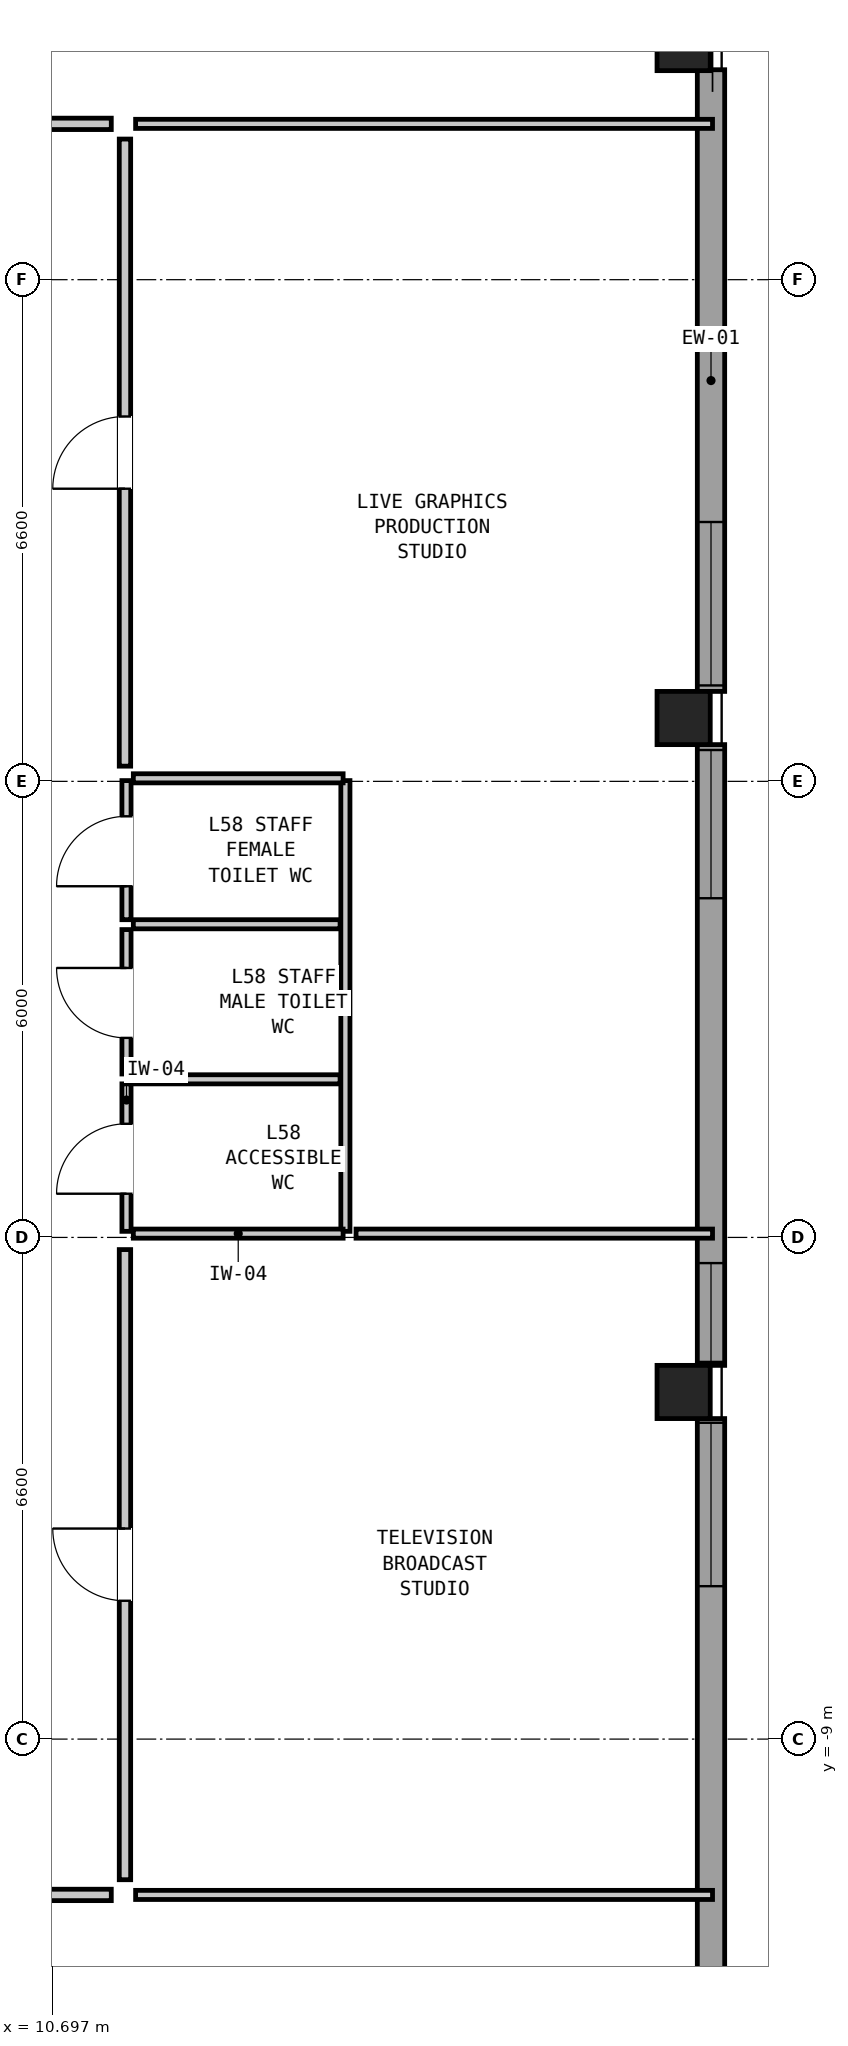
"""IFC4 building model, lengths in metres.
Left out: names, types, materials, properties, quantities, classifications, styles, units other than length and angle.
Written with IfcOpenShell. Run it as: python <this file> out.ifc"""

import sys

from ifc_helpers import new_model, si_unit, direction, frame, frame_2d, origin, origin_2d, place, context, subcontext, project, spatial, rectangle, hollow_rectangle, extrude, element, fill, save


model = new_model("IFC4")
c1 = context("Model", 3, precision=1e-05, world=origin(), true_north=direction((0.0, 1.0)))
c2 = subcontext(c1, "Body", "Model", "MODEL_VIEW")
j1 = project(units=[si_unit("LENGTHUNIT", "METRE"), si_unit("PLANEANGLEUNIT", "RADIAN")], contexts=[c1])
p1 = place(None, origin())
s1 = spatial("IfcSite", under=j1, at=p1, CompositionType="ELEMENT")
p2 = place(p1, origin())
s2 = spatial("IfcBuilding", under=s1, at=p2, CompositionType="ELEMENT")
p3 = place(p2, frame((0.0, 0.0, 199.5)))
s3 = spatial("IfcBuildingStorey", under=s2, at=p3, CompositionType="ELEMENT", Elevation=199.5)
for number, where, z_axis, x_axis in (
    (1, (19.0, -4.433, 0.0), (0.0, 0.0, 1.0), (0.0, 1.0, 0.0)),
    (2, (19.0, 4.433, 0.0), (0.0, 0.0, 1.0), (0.0, 1.0, 0.0)),
    (3, (19.0, 13.3, 0.0), (0.0, 0.0, 1.0), (0.0, 1.0, 0.0)),
):
    element("IfcColumn", number, at=place(p3, frame(where, z_axis=z_axis, x_axis=x_axis)), inside=s3, PredefinedType="COLUMN", context=c2, shape_type="SweptSolid", body=[
        extrude(hollow_rectangle(XDim=0.7, YDim=0.7, WallThickness=0.045, at=origin_2d()), origin(), (0.0, 0.0, 1.0), 3.05),
    ])
p4 = place(p3, frame((19.36, 12.962, 0.0), z_axis=(0.0, 0.0, 1.0), x_axis=(0.0, -1.0, 0.0)))
e4 = element("IfcWall", 4, at=p4, inside=s3, PredefinedType="SOLIDWALL", context=c2, shape_type="SweptSolid", body=[
    extrude(rectangle(XDim=8.179, YDim=0.36, at=frame_2d((4.089, 0.0))), origin(), (0.0, 0.0, 1.0), 1.662),
])
p5 = place(p4, frame((5.95, 0.0, 0.2)))
e5 = element("IfcOpeningElement", 5, at=p5, cuts=e4, PredefinedType="OPENING", context=c2, shape_type="SweptSolid", body=[
    extrude(rectangle(XDim=2.15, YDim=1.05, at=frame_2d((1.075, 0.525))), frame((0.0, 0.192, 0.0), z_axis=(0.0, -1.0, 0.0), x_axis=(1.0, 0.0, 0.0)), (0.0, 0.0, 1.0), 0.384),
])
p6 = place(p3, frame((19.36, 4.083, 0.0), z_axis=(0.0, 0.0, 1.0), x_axis=(0.0, -1.0, 0.0)))
e6 = element("IfcWall", 6, at=p6, inside=s3, PredefinedType="SOLIDWALL", context=c2, shape_type="SweptSolid", body=[
    extrude(rectangle(XDim=8.167, YDim=0.36, at=frame_2d((4.083, 0.0))), origin(), (0.0, 0.0, 1.0), 1.662),
])
p7 = place(p6, frame((0.071, 0.0, 0.2)))
e7 = element("IfcOpeningElement", 7, at=p7, cuts=e6, PredefinedType="OPENING", context=c2, shape_type="SweptSolid", body=[
    extrude(rectangle(XDim=1.95, YDim=0.95, at=frame_2d((0.975, 0.475))), frame((0.0, 0.192, 0.0), z_axis=(0.0, -1.0, 0.0), x_axis=(1.0, 0.0, 0.0)), (0.0, 0.0, 1.0), 0.384),
])
p8 = place(p6, frame((6.821, 0.0, 0.2)))
e8 = element("IfcOpeningElement", 8, at=p8, cuts=e6, PredefinedType="OPENING", context=c2, shape_type="SweptSolid", body=[
    extrude(rectangle(XDim=1.3, YDim=1.3, at=frame_2d((0.65, 0.65))), frame((0.0, 0.192, 0.0), z_axis=(0.0, -1.0, 0.0), x_axis=(1.0, 0.0, 0.0)), (0.0, 0.0, 1.0), 0.384),
])
p9 = place(p3, frame((19.36, -4.783, 0.0), z_axis=(0.0, 0.0, 1.0), x_axis=(0.0, -1.0, 0.0)))
e9 = element("IfcWall", 9, at=p9, inside=s3, PredefinedType="SOLIDWALL", context=c2, shape_type="SweptSolid", body=[
    extrude(rectangle(XDim=8.179, YDim=0.36, at=frame_2d((4.089, 0.0))), origin(), (0.0, 0.0, 1.0), 1.662),
])
p10 = place(p9, frame((0.055, 0.0, 0.2)))
e10 = element("IfcOpeningElement", 10, at=p10, cuts=e9, PredefinedType="OPENING", context=c2, shape_type="SweptSolid", body=[
    extrude(rectangle(XDim=2.15, YDim=1.05, at=frame_2d((1.075, 0.525))), frame((0.0, 0.192, 0.0), z_axis=(0.0, -1.0, 0.0), x_axis=(1.0, 0.0, 0.0)), (0.0, 0.0, 1.0), 0.384),
])
p11 = place(p3, frame((11.67, -2.32, 0.0), z_axis=(0.0, 0.0, 1.0), x_axis=(0.0, 1.0, 0.0)))
e11 = element("IfcWall", 11, at=p11, inside=s3, PredefinedType="PARTITIONING", context=c2, shape_type="SweptSolid", body=[
    extrude(rectangle(XDim=1.94, YDim=0.12, at=frame_2d((0.97, 0.0))), origin(), (0.0, 0.0, 1.0), 2.86),
])
p12 = place(p11, frame((0.495, 0.0, 0.0)))
e12 = element("IfcOpeningElement", 12, at=p12, cuts=e11, PredefinedType="OPENING", context=c2, shape_type="SweptSolid", body=[
    extrude(rectangle(XDim=0.92, YDim=2.1, at=frame_2d((0.46, 1.05))), frame((0.0, 0.072, 0.0), z_axis=(0.0, -1.0, 0.0), x_axis=(1.0, 0.0, 0.0)), (0.0, 0.0, 1.0), 0.144),
])
p13 = place(p3, frame((11.67, -0.25, 0.0), z_axis=(0.0, 0.0, 1.0), x_axis=(0.0, 1.0, 0.0)))
e13 = element("IfcWall", 13, at=p13, inside=s3, PredefinedType="PARTITIONING", context=c2, shape_type="SweptSolid", body=[
    extrude(rectangle(XDim=1.9, YDim=0.12, at=frame_2d((0.95, 0.0))), origin(), (0.0, 0.0, 1.0), 2.86),
])
p14 = place(p13, frame((0.475, 0.0, 0.0)))
e14 = element("IfcOpeningElement", 14, at=p14, cuts=e13, PredefinedType="OPENING", context=c2, shape_type="SweptSolid", body=[
    extrude(rectangle(XDim=0.92, YDim=2.1, at=frame_2d((0.46, 1.05))), frame((0.0, 0.072, 0.0), z_axis=(0.0, -1.0, 0.0), x_axis=(1.0, 0.0, 0.0)), (0.0, 0.0, 1.0), 0.144),
])
p15 = place(p3, frame((11.67, 1.78, 0.0), z_axis=(0.0, 0.0, 1.0), x_axis=(0.0, 1.0, 0.0)))
e15 = element("IfcWall", 15, at=p15, inside=s3, PredefinedType="PARTITIONING", context=c2, shape_type="SweptSolid", body=[
    extrude(rectangle(XDim=1.83, YDim=0.12, at=frame_2d((0.915, 0.0))), origin(), (0.0, 0.0, 1.0), 2.86),
])
p16 = place(p15, frame((0.44, 0.0, 0.0)))
e16 = element("IfcOpeningElement", 16, at=p16, cuts=e15, PredefinedType="OPENING", context=c2, shape_type="SweptSolid", body=[
    extrude(rectangle(XDim=0.92, YDim=2.1, at=frame_2d((0.46, 1.05))), frame((0.0, 0.072, 0.0), z_axis=(0.0, -1.0, 0.0), x_axis=(1.0, 0.0, 0.0)), (0.0, 0.0, 1.0), 0.144),
])
p17 = place(p3, frame((14.55, -2.32, 0.0), z_axis=(0.0, 0.0, 1.0), x_axis=(0.0, 1.0, 0.0)))
e17 = element("IfcWall", 17, at=p17, inside=s3, PredefinedType="PARTITIONING", context=c2, shape_type="SweptSolid", body=[
    extrude(rectangle(XDim=5.93, YDim=0.12, at=frame_2d((2.965, 0.0))), origin(), (0.0, 0.0, 1.0), 2.86),
])
for number, where, z_axis, x_axis in (
    (18, (11.76, -2.35, 0.0), (0.0, 0.0, 1.0), (1.0, 0.0, 0.0)),
    (19, (11.76, 3.64, 0.0), (0.0, 0.0, 1.0), (1.0, 0.0, 0.0)),
):
    element("IfcWall", number, at=place(p3, frame(where, z_axis=z_axis, x_axis=x_axis)), inside=s3, PredefinedType="PARTITIONING", context=c2, shape_type="SweptSolid", body=[
        extrude(rectangle(XDim=2.76, YDim=0.12, at=frame_2d((1.38, 0.0))), origin(), (0.0, 0.0, 1.0), 1.722),
    ])
for number, where, z_axis, x_axis in (
    (20, (11.76, -0.32, 0.0), (0.0, 0.0, 1.0), (1.0, 0.0, 0.0)),
    (21, (11.76, 1.72, 0.0), (0.0, 0.0, 1.0), (1.0, 0.0, 0.0)),
):
    element("IfcWall", number, at=place(p3, frame(where, z_axis=z_axis, x_axis=x_axis)), inside=s3, PredefinedType="PARTITIONING", context=c2, shape_type="SweptSolid", body=[
        extrude(rectangle(XDim=2.72, YDim=0.12, at=frame_2d((1.36, 0.0))), origin(), (0.0, 0.0, 1.0), 2.86),
    ])
for number, where, z_axis, x_axis in (
    (22, (11.79, 12.25, 0.0), (0.0, 0.0, 1.0), (1.0, 0.0, 0.0)),
    (23, (11.79, -11.05, 0.0), (0.0, 0.0, 1.0), (1.0, 0.0, 0.0)),
):
    element("IfcWall", number, at=place(p3, frame(where, z_axis=z_axis, x_axis=x_axis)), inside=s3, PredefinedType="PARTITIONING", context=c2, shape_type="SweptSolid", body=[
        extrude(rectangle(XDim=7.59, YDim=0.12, at=frame_2d((3.795, 0.0))), origin(), (0.0, 0.0, 1.0), 2.86),
    ])
p18 = place(p3, frame((14.69, -2.35, 0.0), z_axis=(0.0, 0.0, 1.0), x_axis=(1.0, 0.0, 0.0)))
e24 = element("IfcWall", 24, at=p18, inside=s3, PredefinedType="PARTITIONING", context=c2, shape_type="SweptSolid", body=[
    extrude(rectangle(XDim=4.69, YDim=0.12, at=frame_2d((2.345, 0.0))), origin(), (0.0, 0.0, 1.0), 1.722),
])
p19 = place(p3, frame((-0.92, 12.25, 0.0), z_axis=(0.0, 0.0, 1.0), x_axis=(1.0, 0.0, 0.0)))
e25 = element("IfcWall", 25, at=p19, inside=s3, PredefinedType="PARTITIONING", context=c2, shape_type="SweptSolid", body=[
    extrude(rectangle(XDim=12.39, YDim=0.15, at=frame_2d((6.195, 0.0))), origin(), (0.0, 0.0, 1.0), 2.86),
])
p20 = place(p19, frame((5.72, 0.0, 0.0)))
e26 = element("IfcOpeningElement", 26, at=p20, cuts=e25, PredefinedType="OPENING", context=c2, shape_type="SweptSolid", body=[
    extrude(rectangle(XDim=0.95, YDim=2.1, at=frame_2d((0.475, 1.05))), frame((0.0, 0.087, 0.0), z_axis=(0.0, -1.0, 0.0), x_axis=(1.0, 0.0, 0.0)), (0.0, 0.0, 1.0), 0.174),
])
p21 = place(p3, frame((-11.12, -11.05, 0.0), z_axis=(0.0, 0.0, 1.0), x_axis=(1.0, 0.0, 0.0)))
e27 = element("IfcWall", 27, at=p21, inside=s3, PredefinedType="PARTITIONING", context=c2, shape_type="SweptSolid", body=[
    extrude(rectangle(XDim=22.59, YDim=0.15, at=frame_2d((11.295, 0.0))), origin(), (0.0, 0.0, 1.0), 2.86),
])
p22 = place(p21, frame((10.82, 0.0, 0.0)))
e28 = element("IfcOpeningElement", 28, at=p22, cuts=e27, PredefinedType="OPENING", context=c2, shape_type="SweptSolid", body=[
    extrude(rectangle(XDim=0.95, YDim=2.1, at=frame_2d((0.475, 1.05))), frame((0.0, 0.087, 0.0), z_axis=(0.0, -1.0, 0.0), x_axis=(1.0, 0.0, 0.0)), (0.0, 0.0, 1.0), 0.174),
])
p23 = place(p3, frame((11.65, -10.85, 0.0), z_axis=(0.0, 0.0, 1.0), x_axis=(0.0, 1.0, 0.0)))
e29 = element("IfcWall", 29, at=p23, inside=s3, PredefinedType="PARTITIONING", context=c2, shape_type="SweptSolid", body=[
    extrude(rectangle(XDim=8.29, YDim=0.15, at=frame_2d((4.145, 0.0))), origin(), (0.0, 0.0, 1.0), 2.86),
])
p24 = place(p23, frame((3.67, 0.0, 0.0)))
e30 = element("IfcOpeningElement", 30, at=p24, cuts=e29, PredefinedType="OPENING", context=c2, shape_type="SweptSolid", body=[
    extrude(rectangle(XDim=0.95, YDim=2.1, at=frame_2d((0.475, 1.05))), frame((0.0, 0.087, 0.0), z_axis=(0.0, -1.0, 0.0), x_axis=(1.0, 0.0, 0.0)), (0.0, 0.0, 1.0), 0.174),
])
p25 = place(p3, frame((11.65, 3.8, 0.0), z_axis=(0.0, 0.0, 1.0), x_axis=(0.0, 1.0, 0.0)))
e31 = element("IfcWall", 31, at=p25, inside=s3, PredefinedType="PARTITIONING", context=c2, shape_type="SweptSolid", body=[
    extrude(rectangle(XDim=8.25, YDim=0.15, at=frame_2d((4.125, 0.0))), origin(), (0.0, 0.0, 1.0), 2.86),
])
p26 = place(p25, frame((3.65, 0.0, 0.0)))
e32 = element("IfcOpeningElement", 32, at=p26, cuts=e31, PredefinedType="OPENING", context=c2, shape_type="SweptSolid", body=[
    extrude(rectangle(XDim=0.95, YDim=2.1, at=frame_2d((0.475, 1.05))), frame((0.0, 0.087, 0.0), z_axis=(0.0, -1.0, 0.0), x_axis=(1.0, 0.0, 0.0)), (0.0, 0.0, 1.0), 0.174),
])
p27 = place(p5, origin())
e33 = element("IfcWindow", 33, at=p27, inside=s3, PartitioningType="SINGLE_PANEL", PredefinedType="WINDOW", context=c2, shape_type="SweptSolid", body=[
    extrude(rectangle(XDim=2.15, YDim=1.05, at=frame_2d((1.075, 0.525))), frame((0.0, 0.03, 0.0), z_axis=(0.0, -1.0, 0.0), x_axis=(1.0, 0.0, 0.0)), (0.0, 0.0, 1.0), 0.06),
])
fill(e5, e33)
p28 = place(p7, origin())
e34 = element("IfcWindow", 34, at=p28, inside=s3, PartitioningType="SINGLE_PANEL", PredefinedType="WINDOW", context=c2, shape_type="SweptSolid", body=[
    extrude(rectangle(XDim=1.95, YDim=0.95, at=frame_2d((0.975, 0.475))), frame((0.0, 0.03, 0.0), z_axis=(0.0, -1.0, 0.0), x_axis=(1.0, 0.0, 0.0)), (0.0, 0.0, 1.0), 0.06),
])
fill(e7, e34)
p29 = place(p8, origin())
e35 = element("IfcWindow", 35, at=p29, inside=s3, PartitioningType="SINGLE_PANEL", PredefinedType="WINDOW", context=c2, shape_type="SweptSolid", body=[
    extrude(rectangle(XDim=1.3, YDim=1.3, at=frame_2d((0.65, 0.65))), frame((0.0, 0.03, 0.0), z_axis=(0.0, -1.0, 0.0), x_axis=(1.0, 0.0, 0.0)), (0.0, 0.0, 1.0), 0.06),
])
fill(e8, e35)
p30 = place(p10, origin())
e36 = element("IfcWindow", 36, at=p30, inside=s3, PartitioningType="SINGLE_PANEL", PredefinedType="WINDOW", context=c2, shape_type="SweptSolid", body=[
    extrude(rectangle(XDim=2.15, YDim=1.05, at=frame_2d((1.075, 0.525))), frame((0.0, 0.03, 0.0), z_axis=(0.0, -1.0, 0.0), x_axis=(1.0, 0.0, 0.0)), (0.0, 0.0, 1.0), 0.06),
])
fill(e10, e36)
p31 = place(p12, origin())
e37 = element("IfcDoor", 37, at=p31, inside=s3, OperationType="SINGLE_SWING_LEFT", PredefinedType="DOOR", context=c2, shape_type="SweptSolid", body=[
    extrude(rectangle(XDim=0.92, YDim=2.1, at=frame_2d((0.46, 1.05))), frame((0.0, 0.025, 0.0), z_axis=(0.0, -1.0, 0.0), x_axis=(1.0, 0.0, 0.0)), (0.0, 0.0, 1.0), 0.05),
])
fill(e12, e37)
p32 = place(p14, origin())
e38 = element("IfcDoor", 38, at=p32, inside=s3, OperationType="SINGLE_SWING_RIGHT", PredefinedType="DOOR", context=c2, shape_type="SweptSolid", body=[
    extrude(rectangle(XDim=0.92, YDim=2.1, at=frame_2d((0.46, 1.05))), frame((0.0, 0.025, 0.0), z_axis=(0.0, -1.0, 0.0), x_axis=(1.0, 0.0, 0.0)), (0.0, 0.0, 1.0), 0.05),
])
fill(e14, e38)
p33 = place(p16, origin())
e39 = element("IfcDoor", 39, at=p33, inside=s3, OperationType="SINGLE_SWING_LEFT", PredefinedType="DOOR", context=c2, shape_type="SweptSolid", body=[
    extrude(rectangle(XDim=0.92, YDim=2.1, at=frame_2d((0.46, 1.05))), frame((0.0, 0.025, 0.0), z_axis=(0.0, -1.0, 0.0), x_axis=(1.0, 0.0, 0.0)), (0.0, 0.0, 1.0), 0.05),
])
fill(e16, e39)
p34 = place(p24, origin())
e40 = element("IfcDoor", 40, at=p34, inside=s3, OperationType="SINGLE_SWING_RIGHT", PredefinedType="DOOR", context=c2, shape_type="SweptSolid", body=[
    extrude(rectangle(XDim=0.95, YDim=2.1, at=frame_2d((0.475, 1.05))), frame((0.0, 0.025, 0.0), z_axis=(0.0, -1.0, 0.0), x_axis=(1.0, 0.0, 0.0)), (0.0, 0.0, 1.0), 0.05),
])
fill(e30, e40)
p35 = place(p26, origin())
e41 = element("IfcDoor", 41, at=p35, inside=s3, OperationType="SINGLE_SWING_LEFT", PredefinedType="DOOR", context=c2, shape_type="SweptSolid", body=[
    extrude(rectangle(XDim=0.95, YDim=2.1, at=frame_2d((0.475, 1.05))), frame((0.0, 0.025, 0.0), z_axis=(0.0, -1.0, 0.0), x_axis=(1.0, 0.0, 0.0)), (0.0, 0.0, 1.0), 0.05),
])
fill(e32, e41)
save(model, sys.argv[1])
